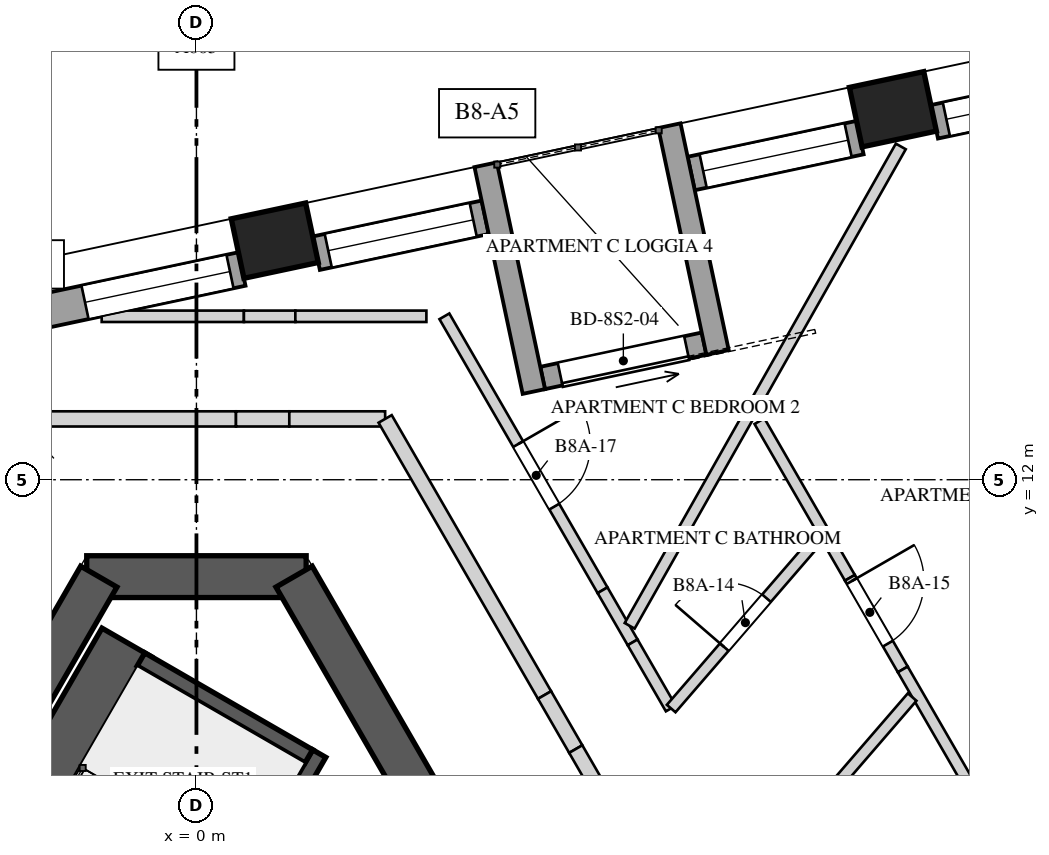
"""IFC4 building model, lengths in metres.
Left out: names, types, materials, properties, quantities, classifications, styles, units other than length and angle.
Written with IfcOpenShell. Run it as: python <this file> out.ifc"""

import sys

from ifc_helpers import new_model, si_unit, direction, frame, frame_2d, origin, origin_2d, place, context, subcontext, project, spatial, polyline, rectangle, outline, extrude, element, fill, save


model = new_model("IFC4")
c1 = context("Model", 3, precision=1e-05, world=origin(), true_north=direction((0.0, 1.0)))
c2 = subcontext(c1, "Body", "Model", "MODEL_VIEW")
j1 = project(units=[si_unit("LENGTHUNIT", "METRE"), si_unit("PLANEANGLEUNIT", "RADIAN")], contexts=[c1])
p1 = place(None, origin())
s1 = spatial("IfcSite", under=j1, at=p1, CompositionType="ELEMENT")
p2 = place(p1, origin())
s2 = spatial("IfcBuilding", under=s1, at=p2, CompositionType="ELEMENT")
p3 = place(p2, frame((0.0, 0.0, 320.4)))
s3 = spatial("IfcBuildingStorey", under=s2, at=p3, CompositionType="ELEMENT", Elevation=320.4)
p4 = place(p3, frame((1.443, 10.725, 0.0), z_axis=(0.0, 0.0, 1.0), x_axis=(-1.0, 0.0, 0.0)))
e1 = element("IfcWall", 1, at=p4, inside=s3, PredefinedType="SHEAR", context=c2, shape_type="SweptSolid", body=[
    extrude(rectangle(XDim=2.887, YDim=0.55, at=frame_2d((1.443, 0.0))), origin(), (0.0, 0.0, 1.0), 4.0),
])
p5 = place(p3, frame((-1.285, 10.725, 0.0), z_axis=(0.0, 0.0, 1.0), x_axis=(-0.499994590896, -0.86602852671, 0.0)))
e2 = element("IfcWall", 2, at=p5, inside=s3, PredefinedType="SHEAR", context=c2, shape_type="SweptSolid", body=[
    extrude(rectangle(XDim=17.292, YDim=0.55, at=frame_2d((8.646, 0.0))), origin(), (0.0, 0.0, 1.0), 4.0),
])
p6 = place(p5, frame((6.851, 0.0, 0.0)))
e3 = element("IfcOpeningElement", 3, at=p6, cuts=e2, PredefinedType="OPENING", context=c2, shape_type="SweptSolid", body=[
    extrude(rectangle(XDim=1.0, YDim=2.4, at=frame_2d((0.5, 1.2))), frame((0.0, 0.285, 0.0), z_axis=(0.0, -1.0, 0.0), x_axis=(1.0, 0.0, 0.0)), (0.0, 0.0, 1.0), 0.57),
])
p7 = place(p5, frame((15.089, 0.0, 0.0)))
e4 = element("IfcOpeningElement", 4, at=p7, cuts=e2, PredefinedType="OPENING", context=c2, shape_type="SweptSolid", body=[
    extrude(rectangle(XDim=0.8, YDim=2.1, at=frame_2d((0.4, 1.05))), frame((0.0, 0.285, 0.0), z_axis=(0.0, -1.0, 0.0), x_axis=(1.0, 0.0, 0.0)), (0.0, 0.0, 1.0), 0.57),
])
p8 = place(p3, frame((9.93, -4.25, 0.0), z_axis=(0.0, 0.0, 1.0), x_axis=(-0.499994590896, 0.86602852671, 0.0)))
e5 = element("IfcWall", 5, at=p8, inside=s3, PredefinedType="SHEAR", context=c2, shape_type="SweptSolid", body=[
    extrude(rectangle(XDim=17.292, YDim=0.55, at=frame_2d((8.646, 0.0))), origin(), (0.0, 0.0, 1.0), 4.0),
])
p9 = place(p8, frame((6.921, 0.0, 0.0)))
e6 = element("IfcOpeningElement", 6, at=p9, cuts=e5, PredefinedType="OPENING", context=c2, shape_type="SweptSolid", body=[
    extrude(rectangle(XDim=1.0, YDim=2.4, at=frame_2d((0.5, 1.2))), frame((0.0, 0.285, 0.0), z_axis=(0.0, -1.0, 0.0), x_axis=(1.0, 0.0, 0.0)), (0.0, 0.0, 1.0), 0.57),
])
for number, where, z_axis, x_axis in (
    (7, (9.163, 16.874, -0.35), (0.0, 0.0, 1.0), (-0.978, -0.208, 0.0)),
    (8, (1.031, 15.145, -0.35), (0.0, 0.0, 1.0), (-0.978, -0.208, 0.0)),
):
    element("IfcColumn", number, at=place(p3, frame(where, z_axis=z_axis, x_axis=x_axis)), inside=s3, PredefinedType="COLUMN", context=c2, shape_type="SweptSolid", body=[
        extrude(rectangle(XDim=1.0, YDim=0.8, at=origin_2d()), origin(), (0.0, 0.0, 1.0), 4.35),
    ])
p10 = place(p3, frame((11.931, 17.181, 0.0), z_axis=(0.0, 0.0, 1.0), x_axis=(-0.978153386925, -0.207884467067, 0.0)))
e9 = element("IfcWall", 9, at=p10, inside=s3, PredefinedType="SOLIDWALL", context=c2, shape_type="SweptSolid", body=[
    extrude(rectangle(XDim=2.271, YDim=0.45, at=frame_2d((1.136, 0.0))), origin(), (0.0, 0.0, 1.0), 3.3),
])
p11 = place(p10, frame((0.161, 0.0, 0.4)))
e10 = element("IfcOpeningElement", 10, at=p11, cuts=e9, PredefinedType="OPENING", context=c2, shape_type="SweptSolid", body=[
    extrude(rectangle(XDim=1.95, YDim=2.75, at=frame_2d((0.975, 1.375))), frame((0.0, 0.235, 0.0), z_axis=(0.0, -1.0, 0.0), x_axis=(1.0, 0.0, 0.0)), (0.0, 0.0, 1.0), 0.47),
])
p12 = place(p3, frame((8.731, 16.501, 0.0), z_axis=(0.0, 0.0, 1.0), x_axis=(-0.978153386925, -0.207884467067, 0.0)))
e11 = element("IfcWall", 11, at=p12, inside=s3, PredefinedType="SOLIDWALL", context=c2, shape_type="SweptSolid", body=[
    extrude(rectangle(XDim=2.271, YDim=0.45, at=frame_2d((1.136, 0.0))), origin(), (0.0, 0.0, 1.0), 3.3),
])
p13 = place(p12, frame((0.161, 0.0, 0.4)))
e12 = element("IfcOpeningElement", 12, at=p13, cuts=e11, PredefinedType="OPENING", context=c2, shape_type="SweptSolid", body=[
    extrude(rectangle(XDim=1.95, YDim=2.1, at=frame_2d((0.975, 1.05))), frame((0.0, 0.235, 0.0), z_axis=(0.0, -1.0, 0.0), x_axis=(1.0, 0.0, 0.0)), (0.0, 0.0, 1.0), 0.47),
])
p14 = place(p3, frame((3.799, 15.452, 0.0), z_axis=(0.0, 0.0, 1.0), x_axis=(-0.978153386925, -0.207884467067, 0.0)))
e13 = element("IfcWall", 13, at=p14, inside=s3, PredefinedType="SOLIDWALL", context=c2, shape_type="SweptSolid", body=[
    extrude(rectangle(XDim=2.271, YDim=0.45, at=frame_2d((1.136, 0.0))), origin(), (0.0, 0.0, 1.0), 3.3),
])
p15 = place(p14, frame((0.161, 0.0, 0.4)))
e14 = element("IfcOpeningElement", 14, at=p15, cuts=e13, PredefinedType="OPENING", context=c2, shape_type="SweptSolid", body=[
    extrude(rectangle(XDim=1.95, YDim=2.75, at=frame_2d((0.975, 1.375))), frame((0.0, 0.235, 0.0), z_axis=(0.0, -1.0, 0.0), x_axis=(1.0, 0.0, 0.0)), (0.0, 0.0, 1.0), 0.47),
])
p16 = place(p3, frame((0.599, 14.772, 0.0), z_axis=(0.0, 0.0, 1.0), x_axis=(-0.978151299843, -0.207894287118, 0.0)))
e15 = element("IfcWall", 15, at=p16, inside=s3, PredefinedType="SOLIDWALL", context=c2, shape_type="SweptSolid", body=[
    extrude(rectangle(XDim=7.314, YDim=0.45, at=frame_2d((3.657, 0.0))), origin(), (0.0, 0.0, 1.0), 3.3),
])
p17 = place(p16, frame((0.161, 0.0, 0.4)))
e16 = element("IfcOpeningElement", 16, at=p17, cuts=e15, PredefinedType="OPENING", context=c2, shape_type="SweptSolid", body=[
    extrude(rectangle(XDim=1.95, YDim=2.75, at=frame_2d((0.975, 1.375))), frame((0.0, 0.235, 0.0), z_axis=(0.0, -1.0, 0.0), x_axis=(1.0, 0.0, 0.0)), (0.0, 0.0, 1.0), 0.47),
])
p18 = place(p16, frame((2.682, 0.0, 0.4)))
e17 = element("IfcOpeningElement", 17, at=p18, cuts=e15, PredefinedType="OPENING", context=c2, shape_type="SweptSolid", body=[
    extrude(rectangle(XDim=1.95, YDim=2.75, at=frame_2d((0.975, 1.375))), frame((0.0, 0.235, 0.0), z_axis=(0.0, -1.0, 0.0), x_axis=(1.0, 0.0, 0.0)), (0.0, 0.0, 1.0), 0.47),
])
p19 = place(p16, frame((5.203, 0.0, 0.4)))
e18 = element("IfcOpeningElement", 18, at=p19, cuts=e15, PredefinedType="OPENING", context=c2, shape_type="SweptSolid", body=[
    extrude(rectangle(XDim=1.95, YDim=2.75, at=frame_2d((0.975, 1.375))), frame((0.0, 0.235, 0.0), z_axis=(0.0, -1.0, 0.0), x_axis=(1.0, 0.0, 0.0)), (0.0, 0.0, 1.0), 0.47),
])
p20 = place(p3, frame((6.678, 13.79, 0.0), z_axis=(0.0, 0.0, 1.0), x_axis=(-0.978153135692, -0.207885649183, 0.0)))
e19 = element("IfcWall", 19, at=p20, inside=s3, PredefinedType="SOLIDWALL", context=c2, shape_type="SweptSolid", body=[
    extrude(rectangle(XDim=2.171, YDim=0.3, at=frame_2d((1.086, 0.0))), origin(), (0.0, 0.0, 1.0), 3.3),
])
p21 = place(p20, frame((0.236, 0.0, 0.0)))
e20 = element("IfcOpeningElement", 20, at=p21, cuts=e19, PredefinedType="OPENING", context=c2, shape_type="SweptSolid", body=[
    extrude(rectangle(XDim=1.7, YDim=2.5, at=frame_2d((0.85, 1.25))), frame((0.0, 0.16, 0.0), z_axis=(0.0, -1.0, 0.0), x_axis=(1.0, 0.0, 0.0)), (0.0, 0.0, 1.0), 0.32),
])
for number, where, z_axis, x_axis in (
    (21, (6.222, 16.658, 0.0), (0.0, 0.0, 1.0), (0.208, -0.978, 0.0)),
    (22, (3.805, 16.144, 0.0), (0.0, 0.0, 1.0), (0.208, -0.978, 0.0)),
):
    element("IfcWall", number, at=place(p3, frame(where, z_axis=z_axis, x_axis=x_axis)), inside=s3, PredefinedType="SOLIDWALL", context=c2, shape_type="SweptSolid", body=[
        extrude(rectangle(XDim=3.05, YDim=0.3, at=frame_2d((1.525, 0.0))), origin(), (0.0, 0.0, 1.0), 3.3),
    ])
p22 = place(p3, frame((-0.918, 9.86, 0.0), z_axis=(0.0, 0.0, 1.0), x_axis=(-0.500026960575, -0.86600983753, 0.0)))
e23 = element("IfcWall", 23, at=p22, inside=s3, PredefinedType="SOLIDWALL", context=c2, shape_type="SweptSolid", body=[
    extrude(rectangle(XDim=6.2, YDim=0.75, at=frame_2d((3.1, 0.0))), origin(), (0.0, 0.0, 1.0), 3.65),
])
p23 = place(p3, frame((1.615, 8.397, 0.0), z_axis=(0.0, 0.0, 1.0), x_axis=(-0.500009909098, -0.866019682689, 0.0)))
e24 = element("IfcWall", 24, at=p23, inside=s3, PredefinedType="SOLIDWALL", context=c2, shape_type="SweptSolid", body=[
    extrude(rectangle(XDim=6.2, YDim=0.2, at=frame_2d((3.1, 0.0))), origin(), (0.0, 0.0, 1.0), 3.65),
])
p24 = place(p3, frame((1.479, 8.361, 0.0), z_axis=(0.0, 0.0, 1.0), x_axis=(-0.865989465428, 0.500062241894, 0.0)))
e25 = element("IfcWall", 25, at=p24, inside=s3, PredefinedType="SOLIDWALL", context=c2, shape_type="SweptSolid", body=[
    extrude(rectangle(XDim=2.55, YDim=0.2, at=frame_2d((1.275, 0.0))), origin(), (0.0, 0.0, 1.0), 3.65),
])
p25 = place(p3, frame((-1.247, 14.15, 0.0), z_axis=(0.0, 0.0, 1.0), x_axis=(1.0, 0.0, 0.0)))
e26 = element("IfcWall", 26, at=p25, inside=s3, PredefinedType="PARTITIONING", context=c2, shape_type="SweptSolid", body=[
    extrude(rectangle(XDim=1.871, YDim=0.15, at=frame_2d((0.936, 0.0))), origin(), (0.0, 0.0, 1.0), 3.65),
])
p26 = place(p3, frame((0.625, 14.15, 0.0), z_axis=(0.0, 0.0, 1.0), x_axis=(1.0, 0.0, 0.0)))
e27 = element("IfcWall", 27, at=p26, inside=s3, PredefinedType="PARTITIONING", context=c2, shape_type="SweptSolid", body=[
    extrude(rectangle(XDim=0.677, YDim=0.15, at=frame_2d((0.338, 0.0))), origin(), (0.0, 0.0, 1.0), 2.95),
])
p27 = place(p3, frame((1.301, 14.15, 0.0), z_axis=(0.0, 0.0, 1.0), x_axis=(1.0, 0.0, 0.0)))
e28 = element("IfcWall", 28, at=p27, inside=s3, PredefinedType="PARTITIONING", context=c2, shape_type="SweptSolid", body=[
    extrude(rectangle(XDim=1.724, YDim=0.15, at=frame_2d((0.862, 0.0))), origin(), (0.0, 0.0, 1.0), 3.65),
])
p28 = place(p3, frame((3.262, 14.15, 0.0), z_axis=(0.0, 0.0, 1.0), x_axis=(0.500032238466, -0.866006790097, 0.0)))
e29 = element("IfcWall", 29, at=p28, inside=s3, PredefinedType="PARTITIONING", context=c2, shape_type="SweptSolid", body=[
    extrude(rectangle(XDim=4.161, YDim=0.15, at=frame_2d((2.081, 0.0))), origin(), (0.0, 0.0, 1.0), 3.65),
])
p29 = place(p28, frame((1.941, 0.0, 0.0)))
e30 = element("IfcOpeningElement", 30, at=p29, cuts=e29, PredefinedType="OPENING", context=c2, shape_type="SweptSolid", body=[
    extrude(rectangle(XDim=0.95, YDim=2.4, at=frame_2d((0.475, 1.2))), frame((0.0, 0.085, 0.0), z_axis=(0.0, -1.0, 0.0), x_axis=(1.0, 0.0, 0.0)), (0.0, 0.0, 1.0), 0.17),
])
p30 = place(p3, frame((5.343, 10.546, 0.0), z_axis=(0.0, 0.0, 1.0), x_axis=(0.499953838557, -0.866052053466, 0.0)))
e31 = element("IfcWall", 31, at=p30, inside=s3, PredefinedType="PARTITIONING", context=c2, shape_type="SweptSolid", body=[
    extrude(rectangle(XDim=0.792, YDim=0.15, at=frame_2d((0.396, 0.0))), origin(), (0.0, 0.0, 1.0), 2.95),
])
p31 = place(p3, frame((5.739, 9.861, 0.0), z_axis=(0.0, 0.0, 1.0), x_axis=(0.500030770168, -0.866007637891, 0.0)))
e32 = element("IfcWall", 32, at=p31, inside=s3, PredefinedType="PARTITIONING", context=c2, shape_type="SweptSolid", body=[
    extrude(rectangle(XDim=1.005, YDim=0.15, at=frame_2d((0.503, 0.0))), origin(), (0.0, 0.0, 1.0), 3.65),
])
p32 = place(p3, frame((5.7, 10.078, 0.0), z_axis=(0.0, 0.0, 1.0), x_axis=(0.492280407927, 0.870436672005, 0.0)))
e33 = element("IfcWall", 33, at=p32, inside=s3, PredefinedType="PARTITIONING", context=c2, shape_type="SweptSolid", body=[
    extrude(rectangle(XDim=7.246, YDim=0.15, at=frame_2d((3.623, 0.0))), origin(), (0.0, 0.0, 1.0), 2.95),
])
p33 = place(p3, frame((6.246, 8.99, 0.0), z_axis=(0.0, 0.0, 1.0), x_axis=(0.653775215384, 0.756688818306, 0.0)))
e34 = element("IfcWall", 34, at=p33, inside=s3, PredefinedType="PARTITIONING", context=c2, shape_type="SweptSolid", body=[
    extrude(rectangle(XDim=2.987, YDim=0.15, at=frame_2d((1.493, 0.0))), origin(), (0.0, 0.0, 1.0), 3.65),
])
p34 = place(p33, frame((1.068, 0.0, 0.0)))
e35 = element("IfcOpeningElement", 35, at=p34, cuts=e34, PredefinedType="OPENING", context=c2, shape_type="SweptSolid", body=[
    extrude(rectangle(XDim=0.85, YDim=2.4, at=frame_2d((0.425, 1.2))), frame((0.0, 0.085, 0.0), z_axis=(0.0, -1.0, 0.0), x_axis=(1.0, 0.0, 0.0)), (0.0, 0.0, 1.0), 0.17),
])
p35 = place(p3, frame((7.407, 12.771, 0.0), z_axis=(0.0, 0.0, 1.0), x_axis=(0.499968171535, -0.866043779177, 0.0)))
e36 = element("IfcWall", 36, at=p35, inside=s3, PredefinedType="PARTITIONING", context=c2, shape_type="SweptSolid", body=[
    extrude(rectangle(XDim=2.38, YDim=0.15, at=frame_2d((1.19, 0.0))), origin(), (0.0, 0.0, 1.0), 3.65),
])
p36 = place(p3, frame((8.597, 10.71, 0.0), z_axis=(0.0, 0.0, 1.0), x_axis=(0.499950230578, -0.866054136267, 0.0)))
e37 = element("IfcWall", 37, at=p36, inside=s3, PredefinedType="PARTITIONING", context=c2, shape_type="SweptSolid", body=[
    extrude(outline(polyline([(0.0, 0.0), (1.392, 0.0), (1.392, 2.55), (0.474, 2.55), (0.474, 3.65), (0.0, 3.65), (0.0, 0.0)])), frame((0.0, 0.075, 0.0), z_axis=(0.0, -1.0, 0.0), x_axis=(1.0, 0.0, 0.0)), (0.0, 0.0, 1.0), 0.15),
])
p37 = place(p36, frame((0.05, 0.0, 0.0)))
e38 = element("IfcOpeningElement", 38, at=p37, cuts=e37, PredefinedType="OPENING", context=c2, shape_type="SweptSolid", body=[
    extrude(rectangle(XDim=0.95, YDim=2.4, at=frame_2d((0.475, 1.2))), frame((0.0, 0.085, 0.0), z_axis=(0.0, -1.0, 0.0), x_axis=(1.0, 0.0, 0.0)), (0.0, 0.0, 1.0), 0.17),
])
p38 = place(p3, frame((9.293, 9.504, 0.0), z_axis=(0.0, 0.0, 1.0), x_axis=(0.500046963369, -0.865998287773, 0.0)))
e39 = element("IfcWall", 39, at=p38, inside=s3, PredefinedType="PARTITIONING", context=c2, shape_type="SweptSolid", body=[
    extrude(rectangle(XDim=1.693, YDim=0.15, at=frame_2d((0.847, 0.0))), origin(), (0.0, 0.0, 1.0), 3.65),
])
p39 = place(p3, frame((9.416, 9.141, 0.0), z_axis=(0.0, 0.0, 1.0), x_axis=(-0.653726199584, -0.756731164931, 0.0)))
e40 = element("IfcWall", 40, at=p39, inside=s3, PredefinedType="PARTITIONING", context=c2, shape_type="SweptSolid", body=[
    extrude(rectangle(XDim=2.989, YDim=0.15, at=frame_2d((1.494, 0.0))), origin(), (0.0, 0.0, 1.0), 3.65),
])
p40 = place(p3, frame((-2.483, 12.8, 0.0), z_axis=(0.0, 0.0, 1.0), x_axis=(1.0, 0.0, 0.0)))
e41 = element("IfcWall", 41, at=p40, inside=s3, PredefinedType="SOLIDWALL", context=c2, shape_type="SweptSolid", body=[
    extrude(rectangle(XDim=3.003, YDim=0.2, at=frame_2d((1.501, 0.0))), origin(), (0.0, 0.0, 1.0), 3.65),
])
p41 = place(p3, frame((0.52, 12.8, 0.0), z_axis=(0.0, 0.0, 1.0), x_axis=(1.0, 0.0, 0.0)))
e42 = element("IfcWall", 42, at=p41, inside=s3, PredefinedType="SOLIDWALL", context=c2, shape_type="SweptSolid", body=[
    extrude(rectangle(XDim=0.701, YDim=0.2, at=frame_2d((0.351, 0.0))), origin(), (0.0, 0.0, 1.0), 2.95),
])
p42 = place(p3, frame((1.222, 12.8, 0.0), z_axis=(0.0, 0.0, 1.0), x_axis=(1.0, 0.0, 0.0)))
e43 = element("IfcWall", 43, at=p42, inside=s3, PredefinedType="SOLIDWALL", context=c2, shape_type="SweptSolid", body=[
    extrude(rectangle(XDim=1.261, YDim=0.2, at=frame_2d((0.63, 0.0))), origin(), (0.0, 0.0, 1.0), 3.65),
])
p43 = place(p3, frame((2.483, 12.8, 0.0), z_axis=(0.0, 0.0, 1.0), x_axis=(0.499982771656, -0.866035350345, 0.0)))
e44 = element("IfcWall", 44, at=p43, inside=s3, PredefinedType="SOLIDWALL", context=c2, shape_type="SweptSolid", body=[
    extrude(rectangle(XDim=4.195, YDim=0.2, at=frame_2d((2.097, 0.0))), origin(), (0.0, 0.0, 1.0), 3.65),
])
p44 = place(p3, frame((4.58, 9.167, 0.0), z_axis=(0.0, 0.0, 1.0), x_axis=(0.499945576647, -0.866056822842, 0.0)))
e45 = element("IfcWall", 45, at=p44, inside=s3, PredefinedType="SOLIDWALL", context=c2, shape_type="SweptSolid", body=[
    extrude(rectangle(XDim=0.821, YDim=0.2, at=frame_2d((0.41, 0.0))), origin(), (0.0, 0.0, 1.0), 2.95),
])
p45 = place(p3, frame((4.99, 8.457, 0.0), z_axis=(0.0, 0.0, 1.0), x_axis=(0.500031220278, -0.866007377998, 0.0)))
e46 = element("IfcWall", 46, at=p45, inside=s3, PredefinedType="SOLIDWALL", context=c2, shape_type="SweptSolid", body=[
    extrude(rectangle(XDim=1.255, YDim=0.2, at=frame_2d((0.627, 0.0))), origin(), (0.0, 0.0, 1.0), 3.65),
])
p46 = place(p11, origin())
e47 = element("IfcWindow", 47, at=p46, inside=s3, PartitioningType="SINGLE_PANEL", PredefinedType="WINDOW", context=c2, shape_type="SweptSolid", body=[
    extrude(rectangle(XDim=1.95, YDim=2.75, at=frame_2d((0.975, 1.375))), frame((0.0, 0.03, 0.0), z_axis=(0.0, -1.0, 0.0), x_axis=(1.0, 0.0, 0.0)), (0.0, 0.0, 1.0), 0.06),
])
fill(e10, e47)
p47 = place(p13, origin())
e48 = element("IfcWindow", 48, at=p47, inside=s3, PartitioningType="SINGLE_PANEL", PredefinedType="WINDOW", context=c2, shape_type="SweptSolid", body=[
    extrude(rectangle(XDim=1.95, YDim=2.1, at=frame_2d((0.975, 1.05))), frame((0.0, 0.03, 0.0), z_axis=(0.0, -1.0, 0.0), x_axis=(1.0, 0.0, 0.0)), (0.0, 0.0, 1.0), 0.06),
])
fill(e12, e48)
p48 = place(p15, origin())
e49 = element("IfcWindow", 49, at=p48, inside=s3, PartitioningType="SINGLE_PANEL", PredefinedType="WINDOW", context=c2, shape_type="SweptSolid", body=[
    extrude(rectangle(XDim=1.95, YDim=2.75, at=frame_2d((0.975, 1.375))), frame((0.0, 0.03, 0.0), z_axis=(0.0, -1.0, 0.0), x_axis=(1.0, 0.0, 0.0)), (0.0, 0.0, 1.0), 0.06),
])
fill(e14, e49)
p49 = place(p17, origin())
e50 = element("IfcWindow", 50, at=p49, inside=s3, PartitioningType="SINGLE_PANEL", PredefinedType="WINDOW", context=c2, shape_type="SweptSolid", body=[
    extrude(rectangle(XDim=1.95, YDim=2.75, at=frame_2d((0.975, 1.375))), frame((0.0, 0.03, 0.0), z_axis=(0.0, -1.0, 0.0), x_axis=(1.0, 0.0, 0.0)), (0.0, 0.0, 1.0), 0.06),
])
fill(e16, e50)
p50 = place(p21, origin())
e51 = element("IfcDoor", 51, at=p50, inside=s3, OperationType="SLIDING_TO_LEFT", PredefinedType="DOOR", context=c2, shape_type="SweptSolid", body=[
    extrude(rectangle(XDim=1.7, YDim=2.5, at=frame_2d((0.85, 1.25))), frame((0.0, 0.025, 0.0), z_axis=(0.0, -1.0, 0.0), x_axis=(1.0, 0.0, 0.0)), (0.0, 0.0, 1.0), 0.05),
])
fill(e20, e51)
p51 = place(p34, origin())
e52 = element("IfcDoor", 52, at=p51, inside=s3, OperationType="SINGLE_SWING_RIGHT", PredefinedType="DOOR", context=c2, shape_type="SweptSolid", body=[
    extrude(rectangle(XDim=0.85, YDim=2.4, at=frame_2d((0.425, 1.2))), frame((0.0, 0.025, 0.0), z_axis=(0.0, -1.0, 0.0), x_axis=(1.0, 0.0, 0.0)), (0.0, 0.0, 1.0), 0.05),
])
fill(e35, e52)
p52 = place(p37, origin())
e53 = element("IfcDoor", 53, at=p52, inside=s3, OperationType="SINGLE_SWING_LEFT", PredefinedType="DOOR", context=c2, shape_type="SweptSolid", body=[
    extrude(rectangle(XDim=0.95, YDim=2.4, at=frame_2d((0.475, 1.2))), frame((0.0, 0.025, 0.0), z_axis=(0.0, -1.0, 0.0), x_axis=(1.0, 0.0, 0.0)), (0.0, 0.0, 1.0), 0.05),
])
fill(e38, e53)
p53 = place(p29, origin())
e54 = element("IfcDoor", 54, at=p53, inside=s3, OperationType="SINGLE_SWING_LEFT", PredefinedType="DOOR", context=c2, shape_type="SweptSolid", body=[
    extrude(rectangle(XDim=0.95, YDim=2.4, at=frame_2d((0.475, 1.2))), frame((0.0, 0.025, 0.0), z_axis=(0.0, -1.0, 0.0), x_axis=(1.0, 0.0, 0.0)), (0.0, 0.0, 1.0), 0.05),
])
fill(e30, e54)
save(model, sys.argv[1])
